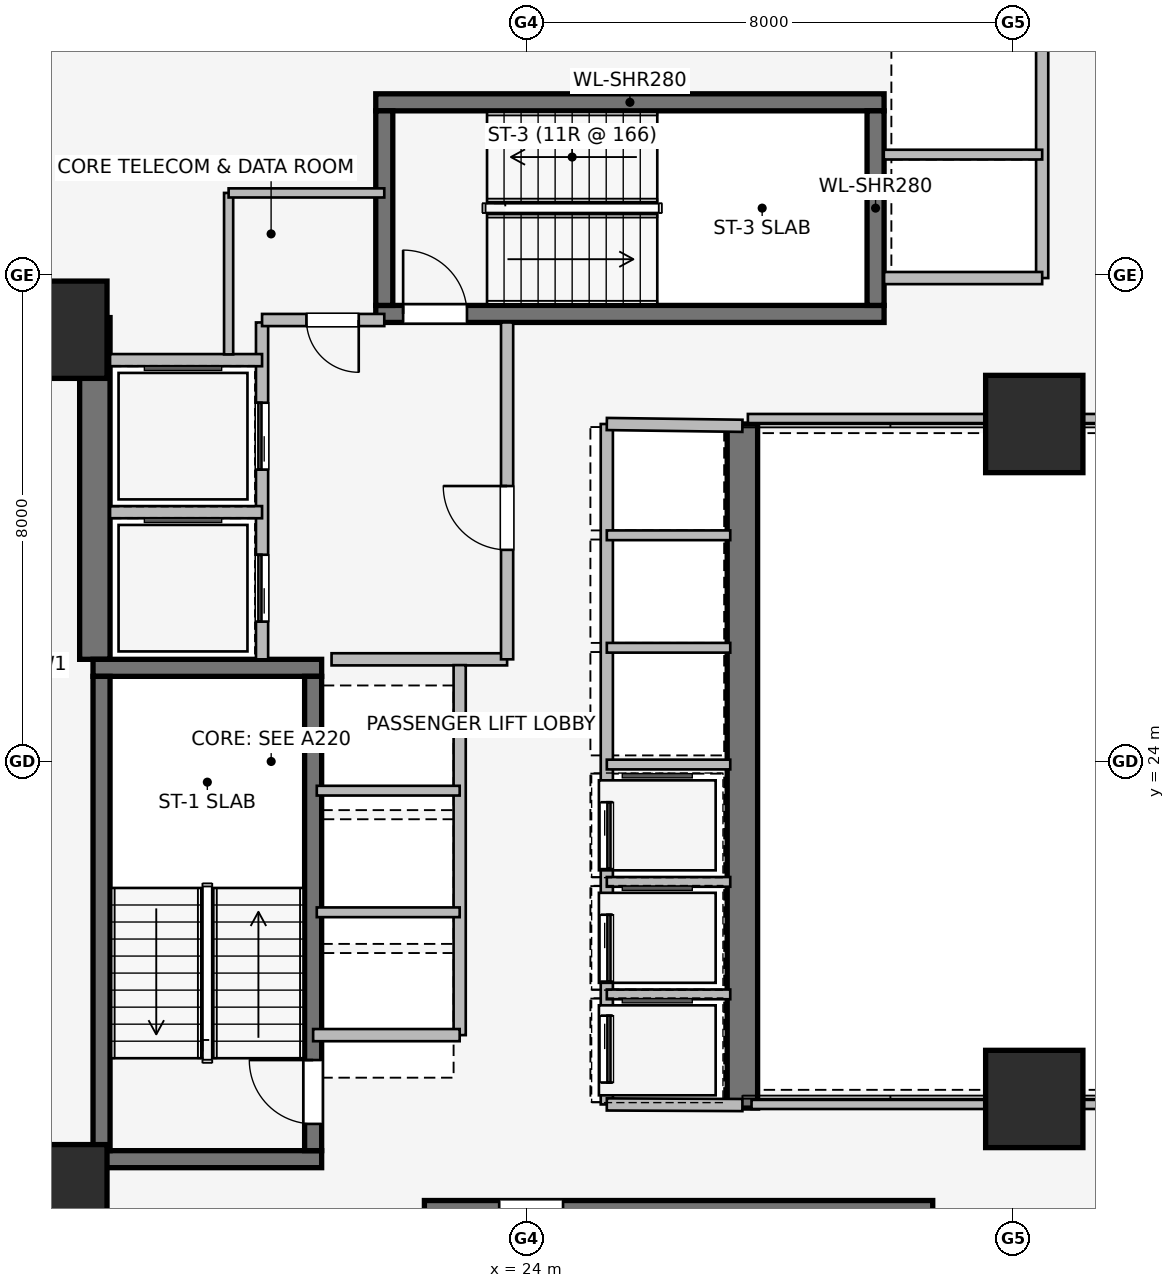
"""IFC4 building model, lengths in metres.
Left out: names, types, materials, properties, quantities, classifications, styles, units other than length and angle.
Written with IfcOpenShell. Run it as: python <this file> out.ifc"""

import sys

from ifc_helpers import new_model, si_unit, direction, frame, frame_2d, origin, origin_2d, place, context, subcontext, project, spatial, rectangle, extrude, element, fill, save


model = new_model("IFC4")
c1 = context("Model", 3, precision=1e-05, world=origin(), true_north=direction((0.0, 1.0)))
c2 = subcontext(c1, "Body", "Model", "MODEL_VIEW")
j1 = project(units=[si_unit("LENGTHUNIT", "METRE"), si_unit("PLANEANGLEUNIT", "RADIAN")], contexts=[c1])
p1 = place(None, origin())
s1 = spatial("IfcSite", under=j1, at=p1, CompositionType="ELEMENT")
p2 = place(p1, origin())
s2 = spatial("IfcBuilding", under=s1, at=p2, CompositionType="ELEMENT")
p3 = place(p2, frame((0.0, 0.0, 70.8)))
s3 = spatial("IfcBuildingStorey", under=s2, at=p3, CompositionType="ELEMENT", Elevation=70.8)
p4 = place(p3, frame((16.9, 25.68, 0.0), z_axis=(0.0, 0.0, 1.0), x_axis=(0.0, 1.0, 0.0)))
e1 = element("IfcWall", 1, at=p4, inside=s3, PredefinedType="SHEAR", context=c2, shape_type="SweptSolid", body=[
    extrude(rectangle(XDim=5.62, YDim=0.5, at=frame_2d((2.81, 0.0))), origin(), (0.0, 0.0, 1.0), 3.65),
])
p5 = place(p3, frame((27.55, 29.55, 0.0), z_axis=(0.0, 0.0, 1.0), x_axis=(0.0, -1.0, 0.0)))
e2 = element("IfcWall", 2, at=p5, inside=s3, PredefinedType="SHEAR", context=c2, shape_type="SweptSolid", body=[
    extrude(rectangle(XDim=11.25, YDim=0.5, at=frame_2d((5.625, 0.0))), origin(), (0.0, 0.0, 1.0), 3.65),
])
for number, where, z_axis, x_axis in (
    (3, (16.87, 17.46, 0.0), (0.0, 0.0, 1.0), (1.0, 0.0, 0.0)),
    (4, (20.63, 25.54, 0.0), (0.0, 0.0, 1.0), (-1.0, 0.0, 0.0)),
):
    element("IfcWall", number, at=place(p3, frame(where, z_axis=z_axis, x_axis=x_axis)), inside=s3, PredefinedType="SHEAR", context=c2, shape_type="SweptSolid", body=[
        extrude(rectangle(XDim=3.76, YDim=0.28, at=frame_2d((1.88, 0.0))), origin(), (0.0, 0.0, 1.0), 3.65),
    ])
p6 = place(p3, frame((17.01, 25.4, 0.0), z_axis=(0.0, 0.0, 1.0), x_axis=(0.0, -1.0, 0.0)))
e5 = element("IfcWall", 5, at=p6, inside=s3, PredefinedType="SHEAR", context=c2, shape_type="SweptSolid", body=[
    extrude(rectangle(XDim=7.8, YDim=0.28, at=frame_2d((3.9, 0.0))), origin(), (0.0, 0.0, 1.0), 3.65),
])
p7 = place(p3, frame((20.49, 17.6, 0.0), z_axis=(0.0, 0.0, 1.0), x_axis=(0.0, 1.0, 0.0)))
e6 = element("IfcWall", 6, at=p7, inside=s3, PredefinedType="SHEAR", context=c2, shape_type="SweptSolid", body=[
    extrude(rectangle(XDim=7.8, YDim=0.28, at=frame_2d((3.9, 0.0))), origin(), (0.0, 0.0, 1.0), 3.65),
])
p8 = place(p7, frame((0.44, 0.0, 0.0)))
e7 = element("IfcOpeningElement", 7, at=p8, cuts=e6, PredefinedType="OPENING", context=c2, shape_type="SweptSolid", body=[
    extrude(rectangle(XDim=1.05, YDim=2.0, at=frame_2d((0.525, 1.0))), frame((0.0, 0.15, 0.0), z_axis=(0.0, -1.0, 0.0), x_axis=(1.0, 0.0, 0.0)), (0.0, 0.0, 1.0), 0.3),
])
p9 = place(p3, frame((30.68, 16.64, 0.0), z_axis=(0.0, 0.0, 1.0), x_axis=(-1.0, 0.0, 0.0)))
e8 = element("IfcWall", 8, at=p9, inside=s3, PredefinedType="SHEAR", context=c2, shape_type="SweptSolid", body=[
    extrude(rectangle(XDim=8.36, YDim=0.28, at=frame_2d((4.18, 0.0))), origin(), (0.0, 0.0, 1.0), 3.65),
])
p10 = place(p9, frame((6.08, 0.0, 0.0)))
e9 = element("IfcOpeningElement", 9, at=p10, cuts=e8, PredefinedType="OPENING", context=c2, shape_type="SweptSolid", body=[
    extrude(rectangle(XDim=1.05, YDim=2.0, at=frame_2d((0.525, 1.0))), frame((0.0, 0.15, 0.0), z_axis=(0.0, -1.0, 0.0), x_axis=(1.0, 0.0, 0.0)), (0.0, 0.0, 1.0), 0.3),
])
p11 = place(p3, frame((21.52, 31.36, 0.0), z_axis=(0.0, 0.0, 1.0), x_axis=(1.0, 0.0, 0.0)))
e10 = element("IfcWall", 10, at=p11, inside=s3, PredefinedType="SHEAR", context=c2, shape_type="SweptSolid", body=[
    extrude(rectangle(XDim=8.36, YDim=0.28, at=frame_2d((4.18, 0.0))), origin(), (0.0, 0.0, 1.0), 3.65),
])
p12 = place(p11, frame((0.45, 0.0, 0.0)))
e11 = element("IfcOpeningElement", 11, at=p12, cuts=e10, PredefinedType="OPENING", context=c2, shape_type="SweptSolid", body=[
    extrude(rectangle(XDim=1.05, YDim=2.0, at=frame_2d((0.525, 1.0))), frame((0.0, 0.15, 0.0), z_axis=(0.0, -1.0, 0.0), x_axis=(1.0, 0.0, 0.0)), (0.0, 0.0, 1.0), 0.3),
])
p13 = place(p3, frame((29.88, 34.84, 0.0), z_axis=(0.0, 0.0, 1.0), x_axis=(-1.0, 0.0, 0.0)))
e12 = element("IfcWall", 12, at=p13, inside=s3, PredefinedType="SHEAR", context=c2, shape_type="SweptSolid", body=[
    extrude(rectangle(XDim=8.36, YDim=0.28, at=frame_2d((4.18, 0.0))), origin(), (0.0, 0.0, 1.0), 3.65),
])
for number, where, z_axis, x_axis in (
    (13, (21.66, 34.7, 0.0), (0.0, 0.0, 1.0), (0.0, -1.0, 0.0)),
    (14, (29.74, 31.5, 0.0), (0.0, 0.0, 1.0), (0.0, 1.0, 0.0)),
):
    element("IfcWall", number, at=place(p3, frame(where, z_axis=z_axis, x_axis=x_axis)), inside=s3, PredefinedType="SHEAR", context=c2, shape_type="SweptSolid", body=[
        extrude(rectangle(XDim=3.2, YDim=0.28, at=frame_2d((1.6, 0.0))), origin(), (0.0, 0.0, 1.0), 3.65),
    ])
for number, where, z_axis, x_axis in (
    (15, (16.3, 16.9, 0.0), (0.0, 0.0, 1.0), (1.0, 0.0, 0.0)),
    (16, (16.3, 31.1, 0.0), (0.0, 0.0, 1.0), (1.0, 0.0, 0.0)),
    (17, (32.35, 18.45, 0.0), (0.0, 0.0, 1.0), (1.0, 0.0, 0.0)),
    (18, (32.35, 29.55, 0.0), (0.0, 0.0, 1.0), (1.0, 0.0, 0.0)),
):
    element("IfcColumn", number, at=place(p3, frame(where, z_axis=z_axis, x_axis=x_axis)), inside=s3, PredefinedType="COLUMN", context=c2, shape_type="SweptSolid", body=[
        extrude(rectangle(XDim=1.6, YDim=1.6, at=origin_2d()), origin(), (0.0, 0.0, 1.0), 3.65),
    ])
p14 = place(p3, frame((19.65, 25.68, 0.0), z_axis=(0.0, 0.0, 1.0), x_axis=(0.0, 1.0, 0.0)))
e19 = element("IfcWall", 19, at=p14, inside=s3, PredefinedType="PARTITIONING", context=c2, shape_type="SweptSolid", body=[
    extrude(rectangle(XDim=5.54, YDim=0.2, at=frame_2d((2.77, 0.0))), origin(), (0.0, 0.0, 1.0), 3.39),
])
p15 = place(p14, frame((0.62, 0.0, 0.0)))
e20 = element("IfcOpeningElement", 20, at=p15, cuts=e19, PredefinedType="OPENING", context=c2, shape_type="SweptSolid", body=[
    extrude(rectangle(XDim=1.1, YDim=2.2, at=frame_2d((0.55, 1.1))), frame((0.0, 0.11, 0.0), z_axis=(0.0, -1.0, 0.0), x_axis=(1.0, 0.0, 0.0)), (0.0, 0.0, 1.0), 0.22),
])
p16 = place(p14, frame((3.12, 0.0, 0.0)))
e21 = element("IfcOpeningElement", 21, at=p16, cuts=e19, PredefinedType="OPENING", context=c2, shape_type="SweptSolid", body=[
    extrude(rectangle(XDim=1.1, YDim=2.2, at=frame_2d((0.55, 1.1))), frame((0.0, 0.11, 0.0), z_axis=(0.0, -1.0, 0.0), x_axis=(1.0, 0.0, 0.0)), (0.0, 0.0, 1.0), 0.22),
])
p17 = place(p3, frame((20.793, 25.68, 0.0), z_axis=(0.0, 0.0, 1.0), x_axis=(1.0, 0.0, 0.0)))
e22 = element("IfcWall", 22, at=p17, inside=s3, PredefinedType="PARTITIONING", context=c2, shape_type="SweptSolid", body=[
    extrude(rectangle(XDim=2.887, YDim=0.2, at=frame_2d((1.443, 0.0))), origin(), (0.0, 0.0, 1.0), 3.39),
])
p18 = place(p3, frame((23.68, 25.68, 0.0), z_axis=(0.0, 0.0, 1.0), x_axis=(0.0, 1.0, 0.0)))
e23 = element("IfcWall", 23, at=p18, inside=s3, PredefinedType="PARTITIONING", context=c2, shape_type="SweptSolid", body=[
    extrude(rectangle(XDim=5.54, YDim=0.2, at=frame_2d((2.77, 0.0))), origin(), (0.0, 0.0, 1.0), 3.39),
])
p19 = place(p18, frame((1.8, 0.0, 0.0)))
e24 = element("IfcOpeningElement", 24, at=p19, cuts=e23, PredefinedType="OPENING", context=c2, shape_type="SweptSolid", body=[
    extrude(rectangle(XDim=1.05, YDim=2.0, at=frame_2d((0.525, 1.0))), frame((0.0, 0.11, 0.0), z_axis=(0.0, -1.0, 0.0), x_axis=(1.0, 0.0, 0.0)), (0.0, 0.0, 1.0), 0.22),
])
p20 = place(p3, frame((21.66, 31.26, 0.0), z_axis=(0.0, 0.0, 1.0), x_axis=(-1.0, 0.0, 0.0)))
e25 = element("IfcWall", 25, at=p20, inside=s3, PredefinedType="PARTITIONING", context=c2, shape_type="SweptSolid", body=[
    extrude(rectangle(XDim=2.01, YDim=0.2, at=frame_2d((1.005, 0.0))), origin(), (0.0, 0.0, 1.0), 3.39),
])
p21 = place(p20, frame((0.42, 0.0, 0.0)))
e26 = element("IfcOpeningElement", 26, at=p21, cuts=e25, PredefinedType="OPENING", context=c2, shape_type="SweptSolid", body=[
    extrude(rectangle(XDim=0.86, YDim=2.0, at=frame_2d((0.43, 1.0))), frame((0.0, 0.11, 0.0), z_axis=(0.0, -1.0, 0.0), x_axis=(1.0, 0.0, 0.0)), (0.0, 0.0, 1.0), 0.22),
])
p22 = place(p3, frame((17.15, 28.1, 0.0), z_axis=(0.0, 0.0, 1.0), x_axis=(1.0, 0.0, 0.0)))
e27 = element("IfcWall", 27, at=p22, inside=s3, PredefinedType="PARTITIONING", context=c2, shape_type="SweptSolid", body=[
    extrude(rectangle(XDim=2.5, YDim=0.2, at=frame_2d((1.25, 0.0))), origin(), (0.0, 0.0, 1.0), 3.39),
])
p23 = place(p3, frame((19.65, 30.6, 0.0), z_axis=(0.0, 0.0, 1.0), x_axis=(-1.0, 0.0, 0.0)))
e28 = element("IfcWall", 28, at=p23, inside=s3, PredefinedType="PARTITIONING", context=c2, shape_type="SweptSolid", body=[
    extrude(rectangle(XDim=2.5, YDim=0.2, at=frame_2d((1.25, 0.0))), origin(), (0.0, 0.0, 1.0), 2.29),
])
p24 = place(p3, frame((32.48, 31.95, 0.0), z_axis=(0.0, 0.0, 1.0), x_axis=(0.0, 1.0, 0.0)))
e29 = element("IfcWall", 29, at=p24, inside=s3, PredefinedType="PARTITIONING", context=c2, shape_type="SweptSolid", body=[
    extrude(rectangle(XDim=4.05, YDim=0.2, at=frame_2d((2.025, 0.0))), origin(), (0.0, 0.0, 1.0), 2.513),
])
p25 = place(p3, frame((32.48, 31.95, 0.0), z_axis=(0.0, 0.0, 1.0), x_axis=(-1.0, 0.0, 0.0)))
e30 = element("IfcWall", 30, at=p25, inside=s3, PredefinedType="PARTITIONING", context=c2, shape_type="SweptSolid", body=[
    extrude(rectangle(XDim=2.6, YDim=0.2, at=frame_2d((1.3, 0.0))), origin(), (0.0, 0.0, 1.0), 3.39),
])
p26 = place(p3, frame((29.875, 33.98, 0.0), z_axis=(0.0, 0.0, 1.0), x_axis=(1.0, 0.0, 0.0)))
e31 = element("IfcWall", 31, at=p26, inside=s3, PredefinedType="PARTITIONING", context=c2, shape_type="SweptSolid", body=[
    extrude(rectangle(XDim=2.605, YDim=0.16, at=frame_2d((1.302, 0.0))), origin(), (0.0, 0.0, 1.0), 3.39),
])
p27 = place(p3, frame((22.9, 19.5, 0.0), z_axis=(0.0, 0.0, 1.0), x_axis=(0.0, 1.0, 0.0)))
e32 = element("IfcWall", 32, at=p27, inside=s3, PredefinedType="PARTITIONING", context=c2, shape_type="SweptSolid", body=[
    extrude(rectangle(XDim=6.085, YDim=0.2, at=frame_2d((3.042, 0.0))), origin(), (0.0, 0.0, 1.0), 3.39),
])
p28 = place(p3, frame((20.49, 19.5, 0.0), z_axis=(0.0, 0.0, 1.0), x_axis=(1.0, 0.0, 0.0)))
e33 = element("IfcWall", 33, at=p28, inside=s3, PredefinedType="PARTITIONING", context=c2, shape_type="SweptSolid", body=[
    extrude(rectangle(XDim=2.41, YDim=0.2, at=frame_2d((1.205, 0.0))), origin(), (0.0, 0.0, 1.0), 2.29),
])
for number, where, z_axis, x_axis in (
    (34, (20.55, 21.52, 0.0), (0.0, 0.0, 1.0), (1.0, 0.0, 0.0)),
    (35, (20.55, 23.52, 0.0), (0.0, 0.0, 1.0), (1.0, 0.0, 0.0)),
):
    element("IfcWall", number, at=place(p3, frame(where, z_axis=z_axis, x_axis=x_axis)), inside=s3, PredefinedType="PARTITIONING", context=c2, shape_type="SweptSolid", body=[
        extrude(rectangle(XDim=2.35, YDim=0.16, at=frame_2d((1.175, 0.0))), origin(), (0.0, 0.0, 1.0), 3.39),
    ])
p29 = place(p3, frame((25.32, 29.55, 0.0), z_axis=(0.0, 0.0, 1.0), x_axis=(0.0, -1.0, 0.0)))
e36 = element("IfcWall", 36, at=p29, inside=s3, PredefinedType="PARTITIONING", context=c2, shape_type="SweptSolid", body=[
    extrude(rectangle(XDim=11.19, YDim=0.2, at=frame_2d((5.595, 0.0))), origin(), (0.0, 0.0, 1.0), 3.39),
])
p30 = place(p29, frame((6.22, 0.0, 0.0)))
e37 = element("IfcOpeningElement", 37, at=p30, cuts=e36, PredefinedType="OPENING", context=c2, shape_type="SweptSolid", body=[
    extrude(rectangle(XDim=1.1, YDim=2.2, at=frame_2d((0.55, 1.1))), frame((0.0, 0.11, 0.0), z_axis=(0.0, -1.0, 0.0), x_axis=(1.0, 0.0, 0.0)), (0.0, 0.0, 1.0), 0.22),
])
p31 = place(p29, frame((8.07, 0.0, 0.0)))
e38 = element("IfcOpeningElement", 38, at=p31, cuts=e36, PredefinedType="OPENING", context=c2, shape_type="SweptSolid", body=[
    extrude(rectangle(XDim=1.1, YDim=2.2, at=frame_2d((0.55, 1.1))), frame((0.0, 0.11, 0.0), z_axis=(0.0, -1.0, 0.0), x_axis=(1.0, 0.0, 0.0)), (0.0, 0.0, 1.0), 0.22),
])
p32 = place(p29, frame((9.73, 0.0, 0.0)))
e39 = element("IfcOpeningElement", 39, at=p32, cuts=e36, PredefinedType="OPENING", context=c2, shape_type="SweptSolid", body=[
    extrude(rectangle(XDim=1.1, YDim=2.2, at=frame_2d((0.55, 1.1))), frame((0.0, 0.11, 0.0), z_axis=(0.0, -1.0, 0.0), x_axis=(1.0, 0.0, 0.0)), (0.0, 0.0, 1.0), 0.22),
])
p33 = place(p3, frame((25.32, 18.36, 0.0), z_axis=(0.0, 0.0, 1.0), x_axis=(0.999989925833, -0.004488678231, 0.0)))
e40 = element("IfcWall", 40, at=p33, inside=s3, PredefinedType="PARTITIONING", context=c2, shape_type="SweptSolid", body=[
    extrude(rectangle(XDim=2.23, YDim=0.2, at=frame_2d((1.115, 0.0))), origin(), (0.0, 0.0, 1.0), 3.39),
])
p34 = place(p3, frame((27.55, 29.52, 0.0), z_axis=(0.0, 0.0, 1.0), x_axis=(-0.999909343457, 0.013464949556, 0.0)))
e41 = element("IfcWall", 41, at=p34, inside=s3, PredefinedType="PARTITIONING", context=c2, shape_type="SweptSolid", body=[
    extrude(rectangle(XDim=2.23, YDim=0.2, at=frame_2d((1.115, 0.0))), origin(), (0.0, 0.0, 1.0), 2.29),
])
for number, where, z_axis, x_axis in (
    (42, (25.32, 20.17, 0.0), (0.0, 0.0, 1.0), (1.0, 0.0, 0.0)),
    (43, (25.32, 22.02, 0.0), (0.0, 0.0, 1.0), (1.0, 0.0, 0.0)),
    (44, (25.32, 23.95, 0.0), (0.0, 0.0, 1.0), (1.0, 0.0, 0.0)),
    (45, (25.32, 25.87, 0.0), (0.0, 0.0, 1.0), (1.0, 0.0, 0.0)),
    (46, (25.32, 27.72, 0.0), (0.0, 0.0, 1.0), (1.0, 0.0, 0.0)),
):
    element("IfcWall", number, at=place(p3, frame(where, z_axis=z_axis, x_axis=x_axis)), inside=s3, PredefinedType="PARTITIONING", context=c2, shape_type="SweptSolid", body=[
        extrude(rectangle(XDim=2.03, YDim=0.16, at=frame_2d((1.015, 0.0))), origin(), (0.0, 0.0, 1.0), 3.39),
    ])
p35 = place(p3, frame((19.1, 33.35, 0.0), z_axis=(0.0, 0.0, 1.0), x_axis=(0.0, -1.0, 0.0)))
e47 = element("IfcWall", 47, at=p35, inside=s3, PredefinedType="PARTITIONING", context=c2, shape_type="SweptSolid", body=[
    extrude(rectangle(XDim=2.655, YDim=0.15, at=frame_2d((1.328, 0.0))), origin(), (0.0, 0.0, 1.0), 3.39),
])
p36 = place(p3, frame((21.66, 33.35, 0.0), z_axis=(0.0, 0.0, 1.0), x_axis=(-1.0, 0.0, 0.0)))
e48 = element("IfcWall", 48, at=p36, inside=s3, PredefinedType="PARTITIONING", context=c2, shape_type="SweptSolid", body=[
    extrude(rectangle(XDim=2.56, YDim=0.15, at=frame_2d((1.28, 0.0))), origin(), (0.0, 0.0, 1.0), 3.39),
])
p37 = place(p3, frame((27.7, 18.36, 0.0), z_axis=(0.0, 0.0, 1.0), x_axis=(1.0, 0.0, 0.0)))
e49 = element("IfcWall", 49, at=p37, inside=s3, PredefinedType="PARTITIONING", context=c2, shape_type="SweptSolid", body=[
    extrude(rectangle(XDim=12.14, YDim=0.15, at=frame_2d((6.07, 0.0))), origin(), (0.0, 0.0, 1.0), 2.531),
])
p38 = place(p3, frame((39.84, 29.64, 0.0), z_axis=(0.0, 0.0, 1.0), x_axis=(-1.0, 0.0, 0.0)))
e50 = element("IfcWall", 50, at=p38, inside=s3, PredefinedType="PARTITIONING", context=c2, shape_type="SweptSolid", body=[
    extrude(rectangle(XDim=12.2, YDim=0.15, at=frame_2d((6.1, 0.0))), origin(), (0.0, 0.0, 1.0), 2.531),
])
p39 = place(p8, origin())
e51 = element("IfcDoor", 51, at=p39, inside=s3, OperationType="SINGLE_SWING_RIGHT", PredefinedType="DOOR", context=c2, shape_type="SweptSolid", body=[
    extrude(rectangle(XDim=1.05, YDim=2.0, at=frame_2d((0.525, 1.0))), frame((0.0, 0.025, 0.0), z_axis=(0.0, -1.0, 0.0), x_axis=(1.0, 0.0, 0.0)), (0.0, 0.0, 1.0), 0.05),
])
fill(e7, e51)
p40 = place(p10, origin())
e52 = element("IfcDoor", 52, at=p40, inside=s3, OperationType="SINGLE_SWING_RIGHT", PredefinedType="DOOR", context=c2, shape_type="SweptSolid", body=[
    extrude(rectangle(XDim=1.05, YDim=2.0, at=frame_2d((0.525, 1.0))), frame((0.0, 0.025, 0.0), z_axis=(0.0, -1.0, 0.0), x_axis=(1.0, 0.0, 0.0)), (0.0, 0.0, 1.0), 0.05),
])
fill(e9, e52)
p41 = place(p12, origin())
e53 = element("IfcDoor", 53, at=p41, inside=s3, OperationType="SINGLE_SWING_LEFT", PredefinedType="DOOR", context=c2, shape_type="SweptSolid", body=[
    extrude(rectangle(XDim=1.05, YDim=2.0, at=frame_2d((0.525, 1.0))), frame((0.0, 0.025, 0.0), z_axis=(0.0, -1.0, 0.0), x_axis=(1.0, 0.0, 0.0)), (0.0, 0.0, 1.0), 0.05),
])
fill(e11, e53)
p42 = place(p15, origin())
e54 = element("IfcDoor", 54, at=p42, inside=s3, OperationType="SLIDING_TO_LEFT", PredefinedType="DOOR", context=c2, shape_type="SweptSolid", body=[
    extrude(rectangle(XDim=1.1, YDim=2.2, at=frame_2d((0.55, 1.1))), frame((0.0, 0.025, 0.0), z_axis=(0.0, -1.0, 0.0), x_axis=(1.0, 0.0, 0.0)), (0.0, 0.0, 1.0), 0.05),
])
fill(e20, e54)
p43 = place(p16, origin())
e55 = element("IfcDoor", 55, at=p43, inside=s3, OperationType="SLIDING_TO_LEFT", PredefinedType="DOOR", context=c2, shape_type="SweptSolid", body=[
    extrude(rectangle(XDim=1.1, YDim=2.2, at=frame_2d((0.55, 1.1))), frame((0.0, 0.025, 0.0), z_axis=(0.0, -1.0, 0.0), x_axis=(1.0, 0.0, 0.0)), (0.0, 0.0, 1.0), 0.05),
])
fill(e21, e55)
p44 = place(p19, origin())
e56 = element("IfcDoor", 56, at=p44, inside=s3, OperationType="SINGLE_SWING_RIGHT", PredefinedType="DOOR", context=c2, shape_type="SweptSolid", body=[
    extrude(rectangle(XDim=1.05, YDim=2.0, at=frame_2d((0.525, 1.0))), frame((0.0, 0.025, 0.0), z_axis=(0.0, -1.0, 0.0), x_axis=(1.0, 0.0, 0.0)), (0.0, 0.0, 1.0), 0.05),
])
fill(e24, e56)
p45 = place(p21, origin())
e57 = element("IfcDoor", 57, at=p45, inside=s3, OperationType="SINGLE_SWING_LEFT", PredefinedType="DOOR", context=c2, shape_type="SweptSolid", body=[
    extrude(rectangle(XDim=0.86, YDim=2.0, at=frame_2d((0.43, 1.0))), frame((0.0, 0.025, 0.0), z_axis=(0.0, -1.0, 0.0), x_axis=(1.0, 0.0, 0.0)), (0.0, 0.0, 1.0), 0.05),
])
fill(e26, e57)
p46 = place(p30, origin())
e58 = element("IfcDoor", 58, at=p46, inside=s3, OperationType="SLIDING_TO_LEFT", PredefinedType="DOOR", context=c2, shape_type="SweptSolid", body=[
    extrude(rectangle(XDim=1.1, YDim=2.2, at=frame_2d((0.55, 1.1))), frame((0.0, 0.025, 0.0), z_axis=(0.0, -1.0, 0.0), x_axis=(1.0, 0.0, 0.0)), (0.0, 0.0, 1.0), 0.05),
])
fill(e37, e58)
p47 = place(p31, origin())
e59 = element("IfcDoor", 59, at=p47, inside=s3, OperationType="SLIDING_TO_LEFT", PredefinedType="DOOR", context=c2, shape_type="SweptSolid", body=[
    extrude(rectangle(XDim=1.1, YDim=2.2, at=frame_2d((0.55, 1.1))), frame((0.0, 0.025, 0.0), z_axis=(0.0, -1.0, 0.0), x_axis=(1.0, 0.0, 0.0)), (0.0, 0.0, 1.0), 0.05),
])
fill(e38, e59)
p48 = place(p32, origin())
e60 = element("IfcDoor", 60, at=p48, inside=s3, OperationType="SLIDING_TO_LEFT", PredefinedType="DOOR", context=c2, shape_type="SweptSolid", body=[
    extrude(rectangle(XDim=1.1, YDim=2.2, at=frame_2d((0.55, 1.1))), frame((0.0, 0.025, 0.0), z_axis=(0.0, -1.0, 0.0), x_axis=(1.0, 0.0, 0.0)), (0.0, 0.0, 1.0), 0.05),
])
fill(e39, e60)
save(model, sys.argv[1])
